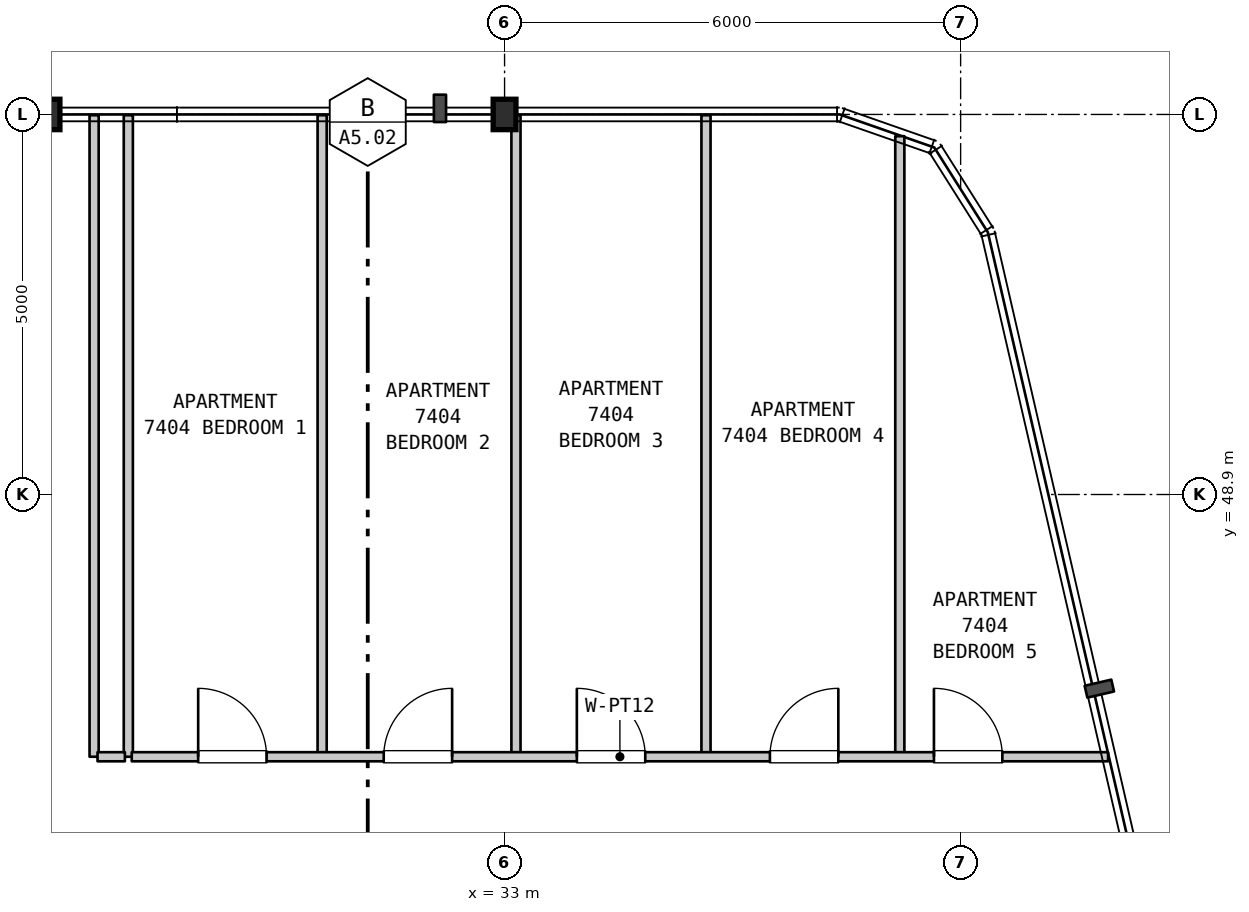
"""IFC4 building model, lengths in metres.
Left out: names, types, materials, properties, quantities, classifications, styles, units other than length and angle.
Written with IfcOpenShell. Run it as: python <this file> out.ifc"""

import sys

from ifc_helpers import new_model, si_unit, direction, frame, frame_2d, origin, origin_2d, place, context, subcontext, project, spatial, rectangle, i_section, extrude, element, fill, save


model = new_model("IFC4")
c1 = context("Model", 3, precision=1e-05, world=origin(), true_north=direction((0.0, 1.0)))
c2 = subcontext(c1, "Body", "Model", "MODEL_VIEW")
j1 = project(units=[si_unit("LENGTHUNIT", "METRE"), si_unit("PLANEANGLEUNIT", "RADIAN")], contexts=[c1])
p1 = place(None, origin())
s1 = spatial("IfcSite", under=j1, at=p1, CompositionType="ELEMENT")
p2 = place(p1, origin())
s2 = spatial("IfcBuilding", under=s1, at=p2, CompositionType="ELEMENT")
p3 = place(p2, frame((0.0, 0.0, 295.4)))
s3 = spatial("IfcBuildingStorey", under=s2, at=p3, CompositionType="ELEMENT", Elevation=295.4)
for number, where, z_axis, x_axis in (
    (1, (27.0, 53.9, 0.0), (0.0, 0.0, 1.0), (1.0, 0.0, 0.0)),
    (2, (33.0, 53.9, 0.0), (0.0, 0.0, 1.0), (1.0, 0.0, 0.0)),
):
    element("IfcColumn", number, at=place(p3, frame(where, z_axis=z_axis, x_axis=x_axis)), inside=s3, PredefinedType="COLUMN", context=c2, shape_type="SweptSolid", body=[
        extrude(i_section(OverallWidth=0.3, OverallDepth=0.4, WebThickness=0.013, FlangeThickness=0.024, FilletRadius=0.027, at=origin_2d()), origin(), (0.0, 0.0, 1.0), 3.7),
    ])
for number, where, z_axis, x_axis in (
    (3, (27.6, 45.45, 0.0), (0.0, 0.0, 1.0), (0.0, 1.0, 0.0)),
    (4, (28.05, 45.45, 0.0), (0.0, 0.0, 1.0), (0.0, 1.0, 0.0)),
    (5, (30.6, 45.45, 0.0), (0.0, 0.0, 1.0), (0.0, 1.0, 0.0)),
):
    element("IfcWall", number, at=place(p3, frame(where, z_axis=z_axis, x_axis=x_axis)), inside=s3, PredefinedType="PARTITIONING", context=c2, shape_type="SweptSolid", body=[
        extrude(rectangle(XDim=8.44, YDim=0.12, at=frame_2d((4.22, 0.0))), origin(), (0.0, 0.0, 1.0), 3.38),
    ])
p4 = place(p3, frame((33.15, 45.45, 0.0), z_axis=(0.0, 0.0, 1.0), x_axis=(0.0, 1.0, 0.0)))
e6 = element("IfcWall", 6, at=p4, inside=s3, PredefinedType="PARTITIONING", context=c2, shape_type="SweptSolid", body=[
    extrude(rectangle(XDim=8.44, YDim=0.12, at=frame_2d((4.22, 0.0))), origin(), (0.0, 0.0, 1.0), 2.78),
])
p5 = place(p3, frame((35.65, 45.45, 0.0), z_axis=(0.0, 0.0, 1.0), x_axis=(0.0, 1.0, 0.0)))
e7 = element("IfcWall", 7, at=p5, inside=s3, PredefinedType="PARTITIONING", context=c2, shape_type="SweptSolid", body=[
    extrude(rectangle(XDim=8.44, YDim=0.12, at=frame_2d((4.22, 0.0))), origin(), (0.0, 0.0, 1.0), 3.38),
])
p6 = place(p3, frame((38.2, 45.45, 0.0), z_axis=(0.0, 0.0, 1.0), x_axis=(0.0, 1.0, 0.0)))
e8 = element("IfcWall", 8, at=p6, inside=s3, PredefinedType="PARTITIONING", context=c2, shape_type="SweptSolid", body=[
    extrude(rectangle(XDim=8.164, YDim=0.12, at=frame_2d((4.082, 0.0))), origin(), (0.0, 0.0, 1.0), 3.38),
])
p7 = place(p3, frame((27.645, 45.45, 0.0), z_axis=(0.0, 0.0, 1.0), x_axis=(1.0, 0.0, 0.0)))
e9 = element("IfcWall", 9, at=p7, inside=s3, PredefinedType="PARTITIONING", context=c2, shape_type="SweptSolid", body=[
    extrude(rectangle(XDim=0.36, YDim=0.12, at=frame_2d((0.18, 0.0))), origin(), (0.0, 0.0, 1.0), 3.38),
])
p8 = place(p3, frame((28.095, 45.45, 0.0), z_axis=(0.0, 0.0, 1.0), x_axis=(1.0, 0.0, 0.0)))
e10 = element("IfcWall", 10, at=p8, inside=s3, PredefinedType="PARTITIONING", context=c2, shape_type="SweptSolid", body=[
    extrude(rectangle(XDim=12.845, YDim=0.12, at=frame_2d((6.422, 0.0))), origin(), (0.0, 0.0, 1.0), 3.38),
])
p9 = place(p8, frame((0.874, 0.0, 0.0)))
e11 = element("IfcOpeningElement", 11, at=p9, cuts=e10, PredefinedType="OPENING", context=c2, shape_type="SweptSolid", body=[
    extrude(rectangle(XDim=0.9, YDim=2.15, at=frame_2d((0.45, 1.075))), frame((0.0, 0.07, 0.0), z_axis=(0.0, -1.0, 0.0), x_axis=(1.0, 0.0, 0.0)), (0.0, 0.0, 1.0), 0.14),
])
p10 = place(p8, frame((3.315, 0.0, 0.0)))
e12 = element("IfcOpeningElement", 12, at=p10, cuts=e10, PredefinedType="OPENING", context=c2, shape_type="SweptSolid", body=[
    extrude(rectangle(XDim=0.9, YDim=2.15, at=frame_2d((0.45, 1.075))), frame((0.0, 0.07, 0.0), z_axis=(0.0, -1.0, 0.0), x_axis=(1.0, 0.0, 0.0)), (0.0, 0.0, 1.0), 0.14),
])
p11 = place(p8, frame((5.856, 0.0, 0.0)))
e13 = element("IfcOpeningElement", 13, at=p11, cuts=e10, PredefinedType="OPENING", context=c2, shape_type="SweptSolid", body=[
    extrude(rectangle(XDim=0.9, YDim=2.15, at=frame_2d((0.45, 1.075))), frame((0.0, 0.07, 0.0), z_axis=(0.0, -1.0, 0.0), x_axis=(1.0, 0.0, 0.0)), (0.0, 0.0, 1.0), 0.14),
])
p12 = place(p8, frame((8.396, 0.0, 0.0)))
e14 = element("IfcOpeningElement", 14, at=p12, cuts=e10, PredefinedType="OPENING", context=c2, shape_type="SweptSolid", body=[
    extrude(rectangle(XDim=0.9, YDim=2.15, at=frame_2d((0.45, 1.075))), frame((0.0, 0.07, 0.0), z_axis=(0.0, -1.0, 0.0), x_axis=(1.0, 0.0, 0.0)), (0.0, 0.0, 1.0), 0.14),
])
p13 = place(p8, frame((10.554, 0.0, 0.0)))
e15 = element("IfcOpeningElement", 15, at=p13, cuts=e10, PredefinedType="OPENING", context=c2, shape_type="SweptSolid", body=[
    extrude(rectangle(XDim=0.9, YDim=2.15, at=frame_2d((0.45, 1.075))), frame((0.0, 0.07, 0.0), z_axis=(0.0, -1.0, 0.0), x_axis=(1.0, 0.0, 0.0)), (0.0, 0.0, 1.0), 0.14),
])
p14 = place(p9, origin())
e16 = element("IfcDoor", 16, at=p14, inside=s3, OperationType="SINGLE_SWING_LEFT", PredefinedType="DOOR", context=c2, shape_type="SweptSolid", body=[
    extrude(rectangle(XDim=0.9, YDim=2.15, at=frame_2d((0.45, 1.075))), frame((0.0, 0.025, 0.0), z_axis=(0.0, -1.0, 0.0), x_axis=(1.0, 0.0, 0.0)), (0.0, 0.0, 1.0), 0.05),
])
fill(e11, e16)
p15 = place(p10, origin())
e17 = element("IfcDoor", 17, at=p15, inside=s3, OperationType="SINGLE_SWING_RIGHT", PredefinedType="DOOR", context=c2, shape_type="SweptSolid", body=[
    extrude(rectangle(XDim=0.9, YDim=2.15, at=frame_2d((0.45, 1.075))), frame((0.0, 0.025, 0.0), z_axis=(0.0, -1.0, 0.0), x_axis=(1.0, 0.0, 0.0)), (0.0, 0.0, 1.0), 0.05),
])
fill(e12, e17)
p16 = place(p11, origin())
e18 = element("IfcDoor", 18, at=p16, inside=s3, OperationType="SINGLE_SWING_LEFT", PredefinedType="DOOR", context=c2, shape_type="SweptSolid", body=[
    extrude(rectangle(XDim=0.9, YDim=2.15, at=frame_2d((0.45, 1.075))), frame((0.0, 0.025, 0.0), z_axis=(0.0, -1.0, 0.0), x_axis=(1.0, 0.0, 0.0)), (0.0, 0.0, 1.0), 0.05),
])
fill(e13, e18)
p17 = place(p12, origin())
e19 = element("IfcDoor", 19, at=p17, inside=s3, OperationType="SINGLE_SWING_RIGHT", PredefinedType="DOOR", context=c2, shape_type="SweptSolid", body=[
    extrude(rectangle(XDim=0.9, YDim=2.15, at=frame_2d((0.45, 1.075))), frame((0.0, 0.025, 0.0), z_axis=(0.0, -1.0, 0.0), x_axis=(1.0, 0.0, 0.0)), (0.0, 0.0, 1.0), 0.05),
])
fill(e14, e19)
p18 = place(p13, origin())
e20 = element("IfcDoor", 20, at=p18, inside=s3, OperationType="SINGLE_SWING_LEFT", PredefinedType="DOOR", context=c2, shape_type="SweptSolid", body=[
    extrude(rectangle(XDim=0.9, YDim=2.15, at=frame_2d((0.45, 1.075))), frame((0.0, 0.025, 0.0), z_axis=(0.0, -1.0, 0.0), x_axis=(1.0, 0.0, 0.0)), (0.0, 0.0, 1.0), 0.05),
])
fill(e15, e20)
save(model, sys.argv[1])
